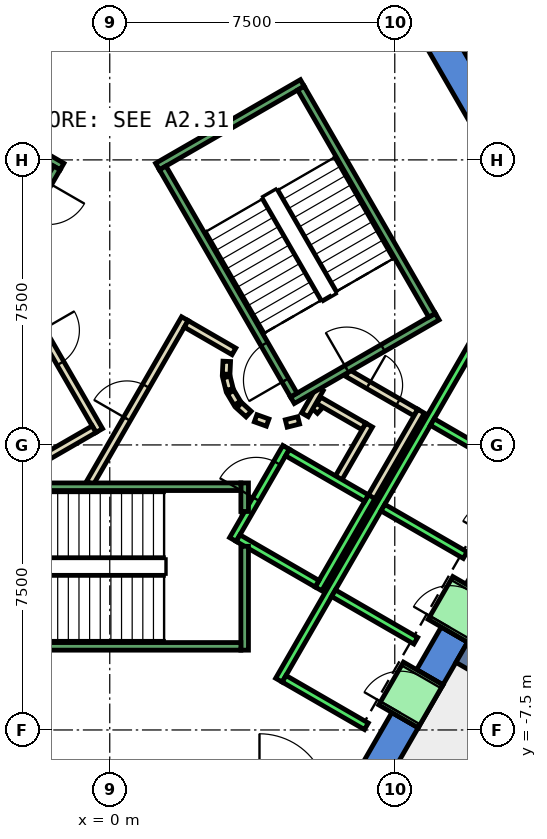
"""IFC4 building model, lengths in metres.
Left out: names, types, materials, properties, quantities, classifications, styles, units other than length and angle.
Written with IfcOpenShell. Run it as: python <this file> out.ifc"""

import sys

from ifc_helpers import new_model, si_unit, direction, frame, frame_2d, origin, place, context, subcontext, project, spatial, polyline, rectangle, outline, extrude, element, fill, save


model = new_model("IFC4")
c1 = context("Model", 3, precision=1e-05, world=origin(), true_north=direction((0.0, 1.0)))
c2 = subcontext(c1, "Body", "Model", "MODEL_VIEW")
j1 = project(units=[si_unit("LENGTHUNIT", "METRE"), si_unit("PLANEANGLEUNIT", "RADIAN")], contexts=[c1])
p1 = place(None, origin())
s1 = spatial("IfcSite", under=j1, at=p1, CompositionType="ELEMENT")
p2 = place(p1, origin())
s2 = spatial("IfcBuilding", under=s1, at=p2, CompositionType="ELEMENT")
p3 = place(p2, frame((0.0, 0.0, 150.8)))
s3 = spatial("IfcBuildingStorey", under=s2, at=p3, CompositionType="ELEMENT", Elevation=150.8)
p4 = place(p3, frame((0.0, 0.0, -0.4)))
e1 = element("IfcWall", 1, at=p4, inside=s3, PredefinedType="SHEAR", context=c2, shape_type="SweptSolid", body=[
    extrude(outline(polyline([(8.517, 11.748), (7.824, 11.348), (12.933, 2.5), (13.856, 2.5), (8.517, 11.748)])), origin(), (0.0, 0.0, 1.0), 4.2),
])
p5 = place(p3, frame((0.0, 0.0, -0.4)))
e2 = element("IfcWall", 2, at=p5, inside=s3, PredefinedType="SHEAR", context=c2, shape_type="SweptSolid", body=[
    extrude(outline(polyline([(8.117, -7.44), (7.424, -7.04), (6.466, -8.7), (6.928, -9.5), (8.117, -7.44)])), origin(), (0.0, 0.0, 1.0), 4.2),
])
p6 = place(p3, frame((0.0, 0.0, -0.4)))
e3 = element("IfcWall", 3, at=p6, inside=s3, PredefinedType="SHEAR", context=c2, shape_type="SweptSolid", body=[
    extrude(outline(polyline([(9.417, -5.189), (8.724, -4.789), (8.075, -5.914), (8.767, -6.314), (9.417, -5.189)])), origin(), (0.0, 0.0, 1.0), 4.2),
])
p7 = place(p3, frame((0.0, 0.0, -0.4)))
e4 = element("IfcWall", 4, at=p7, inside=s3, PredefinedType="SHEAR", context=c2, shape_type="SweptSolid", body=[
    extrude(outline(polyline([(10.717, -2.937), (10.025, -2.537), (9.374, -3.663), (10.067, -4.063), (10.717, -2.937)])), origin(), (0.0, 0.0, 1.0), 4.2),
])
p8 = place(p3, frame((0.0, 0.0, 3.6)))
e5 = element("IfcWall", 5, at=p8, inside=s3, PredefinedType="SHEAR", context=c2, shape_type="SweptSolid", body=[
    extrude(outline(polyline([(8.767, -6.314), (8.075, -5.914), (7.424, -7.04), (8.117, -7.44), (8.767, -6.314)])), origin(), (0.0, 0.0, 1.0), 0.2),
])
p9 = place(p3, frame((0.0, 0.0, 3.6)))
e6 = element("IfcWall", 6, at=p9, inside=s3, PredefinedType="SHEAR", context=c2, shape_type="SweptSolid", body=[
    extrude(outline(polyline([(10.067, -4.063), (9.374, -3.663), (8.724, -4.789), (9.417, -5.189), (10.067, -4.063)])), origin(), (0.0, 0.0, 1.0), 0.2),
])
p10 = place(p3, frame((9.31, -5.375, -0.4), z_axis=(0.0, 0.0, 1.0), x_axis=(0.866017533419, -0.500013631625, 0.0)))
e7 = element("IfcWall", 7, at=p10, inside=s3, PredefinedType="SHEAR", context=c2, shape_type="SweptSolid", body=[
    extrude(rectangle(XDim=9.0, YDim=0.8, at=frame_2d((4.5, 0.0))), origin(), (0.0, 0.0, 1.0), 4.2),
])
p11 = place(p3, frame((5.39, 0.898, 0.0), z_axis=(0.0, 0.0, 1.0), x_axis=(0.673828488714, 0.738887791073, 0.0)))
e8 = element("IfcWall", 8, at=p11, inside=s3, PredefinedType="PARTITIONING", context=c2, shape_type="SweptSolid", body=[
    extrude(rectangle(XDim=0.263, YDim=0.2, at=frame_2d((0.131, 0.0))), origin(), (0.0, 0.0, 1.0), 3.8),
])
p12 = place(p3, frame((5.499, 1.172, 0.0), z_axis=(0.0, 0.0, 1.0), x_axis=(0.866333505267, -0.499465972466, 0.0)))
e9 = element("IfcWall", 9, at=p12, inside=s3, PredefinedType="PARTITIONING", context=c2, shape_type="SweptSolid", body=[
    extrude(rectangle(XDim=1.374, YDim=0.2, at=frame_2d((0.687, 0.0))), origin(), (0.0, 0.0, 1.0), 3.8),
])
p13 = place(p3, frame((6.826, 0.522, 0.0), z_axis=(0.0, 0.0, 1.0), x_axis=(-0.500016722714, -0.866015748706, 0.0)))
e10 = element("IfcWall", 10, at=p13, inside=s3, PredefinedType="PARTITIONING", context=c2, shape_type="SweptSolid", body=[
    extrude(rectangle(XDim=1.7, YDim=0.2, at=frame_2d((0.85, 0.0))), origin(), (0.0, 0.0, 1.0), 3.8),
])
p14 = place(p3, frame((6.25, 1.894, 0.0), z_axis=(0.0, 0.0, 1.0), x_axis=(0.866043184279, -0.499969202016, 0.0)))
e11 = element("IfcWall", 11, at=p14, inside=s3, PredefinedType="PARTITIONING", context=c2, shape_type="SweptSolid", body=[
    extrude(rectangle(XDim=2.084, YDim=0.2, at=frame_2d((1.042, 0.0))), origin(), (0.0, 0.0, 1.0), 3.8),
])
p15 = place(p14, frame((0.642, 0.0, 0.0)))
e12 = element("IfcOpeningElement", 12, at=p15, cuts=e11, PredefinedType="OPENING", context=c2, shape_type="SweptSolid", body=[
    extrude(rectangle(XDim=0.9, YDim=2.1, at=frame_2d((0.45, 1.05))), frame((0.0, 0.11, 0.0), z_axis=(0.0, -1.0, 0.0), x_axis=(1.0, 0.0, 0.0)), (0.0, 0.0, 1.0), 0.22),
])
p16 = place(p3, frame((8.192, 0.888, 0.0), z_axis=(0.0, 0.0, 1.0), x_axis=(-0.499940625693, -0.866059680843, 0.0)))
e13 = element("IfcWall", 13, at=p16, inside=s3, PredefinedType="PARTITIONING", context=c2, shape_type="SweptSolid", body=[
    extrude(rectangle(XDim=2.68, YDim=0.2, at=frame_2d((1.34, 0.0))), origin(), (0.0, 0.0, 1.0), 3.8),
])
p17 = place(p3, frame((5.135, 0.793, 0.0), z_axis=(0.0, 0.0, 1.0), x_axis=(0.499526442893, 0.866298639529, 0.0)))
e14 = element("IfcWall", 14, at=p17, inside=s3, PredefinedType="PARTITIONING", context=c2, shape_type="SweptSolid", body=[
    extrude(rectangle(XDim=0.791, YDim=0.2, at=frame_2d((0.396, 0.0))), origin(), (0.0, 0.0, 1.0), 3.8),
])
p18 = place(p3, frame((-0.52, -1.0, 0.0), z_axis=(0.0, 0.0, 1.0), x_axis=(0.50011622646, 0.865958290007, 0.0)))
e15 = element("IfcWall", 15, at=p18, inside=s3, PredefinedType="PARTITIONING", context=c2, shape_type="SweptSolid", body=[
    extrude(rectangle(XDim=4.991, YDim=0.2, at=frame_2d((2.496, 0.0))), origin(), (0.0, 0.0, 1.0), 3.8),
])
p19 = place(p18, frame((1.945, 0.0, 0.0)))
e16 = element("IfcOpeningElement", 16, at=p19, cuts=e15, PredefinedType="OPENING", context=c2, shape_type="SweptSolid", body=[
    extrude(rectangle(XDim=1.0, YDim=2.1, at=frame_2d((0.5, 1.05))), frame((0.0, 0.11, 0.0), z_axis=(0.0, -1.0, 0.0), x_axis=(1.0, 0.0, 0.0)), (0.0, 0.0, 1.0), 0.22),
])
p20 = place(p3, frame((2.012, 3.186, 0.0), z_axis=(0.0, 0.0, 1.0), x_axis=(0.865891012941, -0.500232699559, 0.0)))
e17 = element("IfcWall", 17, at=p20, inside=s3, PredefinedType="PARTITIONING", context=c2, shape_type="SweptSolid", body=[
    extrude(rectangle(XDim=1.449, YDim=0.2, at=frame_2d((0.725, 0.0))), origin(), (0.0, 0.0, 1.0), 3.8),
])
p21 = place(p3, frame((3.079, 2.199, 0.0), z_axis=(0.0, 0.0, 1.0), x_axis=(-0.047771483479, -0.998858290933, 0.0)))
e18 = element("IfcWall", 18, at=p21, inside=s3, PredefinedType="PARTITIONING", context=c2, shape_type="SweptSolid", body=[
    extrude(rectangle(XDim=0.337, YDim=0.2, at=frame_2d((0.169, 0.0))), origin(), (0.0, 0.0, 1.0), 3.8),
])
p22 = place(p3, frame((3.07, 1.786, 0.0), z_axis=(0.0, 0.0, 1.0), x_axis=(0.242705583207, -0.970099994784, 0.0)))
e19 = element("IfcWall", 19, at=p22, inside=s3, PredefinedType="PARTITIONING", context=c2, shape_type="SweptSolid", body=[
    extrude(rectangle(XDim=0.338, YDim=0.2, at=frame_2d((0.169, 0.0))), origin(), (0.0, 0.0, 1.0), 3.8),
])
for number, where, z_axis, x_axis in (
    (20, (3.182, 1.388, 0.0), (0.0, 0.0, 1.0), (0.512, -0.859, 0.0)),
    (21, (3.404, 1.039, 0.0), (0.0, 0.0, 1.0), (0.74, -0.672, 0.0)),
):
    element("IfcWall", number, at=place(p3, frame(where, z_axis=z_axis, x_axis=x_axis)), inside=s3, PredefinedType="PARTITIONING", context=c2, shape_type="SweptSolid", body=[
        extrude(rectangle(XDim=0.338, YDim=0.2, at=frame_2d((0.169, 0.0))), origin(), (0.0, 0.0, 1.0), 3.8),
    ])
p23 = place(p3, frame((3.838, 0.702, 0.0), z_axis=(0.0, 0.0, 1.0), x_axis=(0.941035081519, -0.338308993895, 0.0)))
e22 = element("IfcWall", 22, at=p23, inside=s3, PredefinedType="PARTITIONING", context=c2, shape_type="SweptSolid", body=[
    extrude(rectangle(XDim=0.337, YDim=0.2, at=frame_2d((0.168, 0.0))), origin(), (0.0, 0.0, 1.0), 3.8),
])
p24 = place(p3, frame((4.644, 0.564, 0.0), z_axis=(0.0, 0.0, 1.0), x_axis=(0.969929076366, 0.243387729394, 0.0)))
e23 = element("IfcWall", 23, at=p24, inside=s3, PredefinedType="PARTITIONING", context=c2, shape_type="SweptSolid", body=[
    extrude(rectangle(XDim=0.337, YDim=0.2, at=frame_2d((0.168, 0.0))), origin(), (0.0, 0.0, 1.0), 3.8),
])
p25 = place(p3, frame((-2.771, 4.7, 0.0), z_axis=(0.0, 0.0, 1.0), x_axis=(0.499969479948, -0.866043023828, 0.0)))
e24 = element("IfcWall", 24, at=p25, inside=s3, PredefinedType="PARTITIONING", context=c2, shape_type="SweptSolid", body=[
    extrude(rectangle(XDim=4.99, YDim=0.2, at=frame_2d((2.495, 0.0))), origin(), (0.0, 0.0, 1.0), 3.8),
])
p26 = place(p25, frame((1.945, 0.0, 0.0)))
e25 = element("IfcOpeningElement", 25, at=p26, cuts=e24, PredefinedType="OPENING", context=c2, shape_type="SweptSolid", body=[
    extrude(rectangle(XDim=1.0, YDim=2.1, at=frame_2d((0.5, 1.05))), frame((0.0, 0.11, 0.0), z_axis=(0.0, -1.0, 0.0), x_axis=(1.0, 0.0, 0.0)), (0.0, 0.0, 1.0), 0.22),
])
p27 = place(p3, frame((-0.412, 0.414, 0.0), z_axis=(0.0, 0.0, 1.0), x_axis=(-0.866017369001, -0.500013916395, 0.0)))
e26 = element("IfcWall", 26, at=p27, inside=s3, PredefinedType="PARTITIONING", context=c2, shape_type="SweptSolid", body=[
    extrude(rectangle(XDim=1.45, YDim=0.2, at=frame_2d((0.725, 0.0))), origin(), (0.0, 0.0, 1.0), 3.8),
])
p28 = place(p3, frame((12.401, -7.621, 0.0), z_axis=(0.0, 0.0, 1.0), x_axis=(-0.499983724212, -0.866034800411, 0.0)))
e27 = element("IfcWall", 27, at=p28, inside=s3, PredefinedType="PARTITIONING", context=c2, shape_type="SweptSolid", body=[
    extrude(rectangle(XDim=9.302, YDim=0.2, at=frame_2d((4.651, 0.0))), origin(), (0.0, 0.0, 1.0), 3.8),
])
p29 = place(p3, frame((3.24, -2.488, 0.0), z_axis=(0.0, 0.0, 1.0), x_axis=(0.49994636267, 0.866056369097, 0.0)))
e28 = element("IfcWall", 28, at=p29, inside=s3, PredefinedType="STANDARD", context=c2, shape_type="SweptSolid", body=[
    extrude(rectangle(XDim=2.8, YDim=0.2, at=frame_2d((1.4, 0.0))), origin(), (0.0, 0.0, 1.0), 3.8),
])
p30 = place(p29, frame((1.225, 0.0, 0.0)))
e29 = element("IfcOpeningElement", 29, at=p30, cuts=e28, PredefinedType="OPENING", context=c2, shape_type="SweptSolid", body=[
    extrude(rectangle(XDim=1.1, YDim=2.1, at=frame_2d((0.55, 1.05))), frame((0.0, 0.11, 0.0), z_axis=(0.0, -1.0, 0.0), x_axis=(1.0, 0.0, 0.0)), (0.0, 0.0, 1.0), 0.22),
])
p31 = place(p3, frame((5.492, -3.788, 0.0), z_axis=(0.0, 0.0, 1.0), x_axis=(0.500011755427, 0.866018616679, 0.0)))
e30 = element("IfcWall", 30, at=p31, inside=s3, PredefinedType="STANDARD", context=c2, shape_type="SweptSolid", body=[
    extrude(rectangle(XDim=2.8, YDim=0.2, at=frame_2d((1.4, 0.0))), origin(), (0.0, 0.0, 1.0), 3.8),
])
p32 = place(p3, frame((3.377, -2.452, 0.0), z_axis=(0.0, 0.0, 1.0), x_axis=(0.865955154139, -0.50012165622, 0.0)))
e31 = element("IfcWall", 31, at=p32, inside=s3, PredefinedType="STANDARD", context=c2, shape_type="SweptSolid", body=[
    extrude(rectangle(XDim=2.4, YDim=0.2, at=frame_2d((1.2, 0.0))), origin(), (0.0, 0.0, 1.0), 3.8),
])
p33 = place(p3, frame((4.677, -0.2, 0.0), z_axis=(0.0, 0.0, 1.0), x_axis=(0.865973769406, -0.500089422704, 0.0)))
e32 = element("IfcWall", 32, at=p33, inside=s3, PredefinedType="STANDARD", context=c2, shape_type="SweptSolid", body=[
    extrude(rectangle(XDim=2.399, YDim=0.2, at=frame_2d((1.2, 0.0))), origin(), (0.0, 0.0, 1.0), 3.8),
])
p34 = place(p3, frame((4.451, -6.19, 0.0), z_axis=(0.0, 0.0, 1.0), x_axis=(0.50000090737, 0.866024879913, 0.0)))
e33 = element("IfcWall", 33, at=p34, inside=s3, PredefinedType="STANDARD", context=c2, shape_type="SweptSolid", body=[
    extrude(rectangle(XDim=10.6, YDim=0.2, at=frame_2d((5.3, 0.0))), origin(), (0.0, 0.0, 1.0), 3.8),
])
for number, where, z_axis, x_axis in (
    (34, (4.588, -6.153, 0.0), (0.0, 0.0, 1.0), (0.866, -0.5, 0.0)),
    (35, (5.888, -3.902, 0.0), (0.0, 0.0, 1.0), (0.866, -0.5, 0.0)),
    (36, (7.188, -1.65, 0.0), (0.0, 0.0, 1.0), (0.866, -0.5, 0.0)),
    (37, (8.488, 0.602, 0.0), (0.0, 0.0, 1.0), (0.866, -0.5, 0.0)),
):
    element("IfcWall", number, at=place(p3, frame(where, z_axis=z_axis, x_axis=x_axis)), inside=s3, PredefinedType="STANDARD", context=c2, shape_type="SweptSolid", body=[
        extrude(rectangle(XDim=2.5, YDim=0.2, at=frame_2d((1.25, 0.0))), origin(), (0.0, 0.0, 1.0), 3.8),
    ])
p35 = place(p3, frame((7.598, -7.14, 0.0), z_axis=(0.0, 0.0, 1.0), x_axis=(0.500362116554, 0.865816234728, 0.0)))
e38 = element("IfcWall", 38, at=p35, inside=s3, PredefinedType="STANDARD", context=c2, shape_type="SweptSolid", body=[
    extrude(rectangle(XDim=1.299, YDim=1.2, at=frame_2d((0.65, 0.0))), origin(), (0.0, 0.0, 1.0), 2.4),
])
p36 = place(p35, frame((0.1, 0.0, 0.0)))
e39 = element("IfcOpeningElement", 39, at=p36, cuts=e38, PredefinedType="OPENING", context=c2, shape_type="SweptSolid", body=[
    extrude(rectangle(XDim=1.1, YDim=2.3, at=frame_2d((0.55, 1.15))), frame((0.0, 0.61, 0.0), z_axis=(0.0, -1.0, 0.0), x_axis=(1.0, 0.0, 0.0)), (0.0, 0.0, 1.0), 1.22),
])
p37 = place(p3, frame((8.898, -4.889, 0.0), z_axis=(0.0, 0.0, 1.0), x_axis=(0.500036693733, 0.866004217611, 0.0)))
e40 = element("IfcWall", 40, at=p37, inside=s3, PredefinedType="STANDARD", context=c2, shape_type="SweptSolid", body=[
    extrude(rectangle(XDim=1.3, YDim=1.2, at=frame_2d((0.65, 0.0))), origin(), (0.0, 0.0, 1.0), 2.4),
])
p38 = place(p37, frame((0.1, 0.0, 0.0)))
e41 = element("IfcOpeningElement", 41, at=p38, cuts=e40, PredefinedType="OPENING", context=c2, shape_type="SweptSolid", body=[
    extrude(rectangle(XDim=1.1, YDim=2.3, at=frame_2d((0.55, 1.15))), frame((0.0, 0.61, 0.0), z_axis=(0.0, -1.0, 0.0), x_axis=(1.0, 0.0, 0.0)), (0.0, 0.0, 1.0), 1.22),
])
p39 = place(p3, frame((3.55, -2.667, 0.0), z_axis=(0.0, 0.0, 1.0), x_axis=(0.0, -1.0, 0.0)))
e42 = element("IfcWall", 42, at=p39, inside=s3, PredefinedType="STANDARD", context=c2, shape_type="SweptSolid", body=[
    extrude(rectangle(XDim=2.733, YDim=0.2, at=frame_2d((1.366, 0.0))), origin(), (0.0, 0.0, 1.0), 3.8),
])
p40 = place(p3, frame((3.55, -1.0, 0.0), z_axis=(0.0, 0.0, 1.0), x_axis=(0.0, -1.0, 0.0)))
e43 = element("IfcWall", 43, at=p40, inside=s3, PredefinedType="STANDARD", context=c2, shape_type="SweptSolid", body=[
    extrude(rectangle(XDim=0.751, YDim=0.2, at=frame_2d((0.375, 0.0))), origin(), (0.0, 0.0, 1.0), 3.8),
])
p41 = place(p3, frame((-3.45, -1.1, 0.0), z_axis=(0.0, 0.0, 1.0), x_axis=(1.0, 0.0, 0.0)))
e44 = element("IfcWall", 44, at=p41, inside=s3, PredefinedType="STANDARD", context=c2, shape_type="SweptSolid", body=[
    extrude(rectangle(XDim=6.9, YDim=0.2, at=frame_2d((3.45, 0.0))), origin(), (0.0, 0.0, 1.0), 3.8),
])
p42 = place(p41, frame((0.45, 0.0, 0.0)))
e45 = element("IfcOpeningElement", 45, at=p42, cuts=e44, PredefinedType="OPENING", context=c2, shape_type="SweptSolid", body=[
    extrude(rectangle(XDim=1.1, YDim=2.2, at=frame_2d((0.55, 1.1))), frame((0.0, 0.11, 0.0), z_axis=(0.0, -1.0, 0.0), x_axis=(1.0, 0.0, 0.0)), (0.0, 0.0, 1.0), 0.22),
])
p43 = place(p3, frame((-3.45, -5.3, 0.0), z_axis=(0.0, 0.0, 1.0), x_axis=(1.0, 0.0, 0.0)))
e46 = element("IfcWall", 46, at=p43, inside=s3, PredefinedType="STANDARD", context=c2, shape_type="SweptSolid", body=[
    extrude(rectangle(XDim=6.9, YDim=0.2, at=frame_2d((3.45, 0.0))), origin(), (0.0, 0.0, 1.0), 3.8),
])
p44 = place(p3, frame((4.806, 1.176, 0.0), z_axis=(0.0, 0.0, 1.0), x_axis=(0.866059941101, 0.499940174841, 0.0)))
e47 = element("IfcWall", 47, at=p44, inside=s3, PredefinedType="STANDARD", context=c2, shape_type="SweptSolid", body=[
    extrude(rectangle(XDim=4.4, YDim=0.2, at=frame_2d((2.2, 0.0))), origin(), (0.0, 0.0, 1.0), 3.8),
])
p45 = place(p44, frame((1.65, 0.0, 0.0)))
e48 = element("IfcOpeningElement", 48, at=p45, cuts=e47, PredefinedType="OPENING", context=c2, shape_type="SweptSolid", body=[
    extrude(rectangle(XDim=1.1, YDim=2.2, at=frame_2d((0.55, 1.1))), frame((0.0, 0.11, 0.0), z_axis=(0.0, -1.0, 0.0), x_axis=(1.0, 0.0, 0.0)), (0.0, 0.0, 1.0), 0.22),
])
p46 = place(p3, frame((1.256, 7.324, 0.0), z_axis=(0.0, 0.0, 1.0), x_axis=(0.866046073146, 0.499964197906, 0.0)))
e49 = element("IfcWall", 49, at=p46, inside=s3, PredefinedType="STANDARD", context=c2, shape_type="SweptSolid", body=[
    extrude(rectangle(XDim=4.4, YDim=0.2, at=frame_2d((2.2, 0.0))), origin(), (0.0, 0.0, 1.0), 3.8),
])
p47 = place(p3, frame((4.843, 1.312, 0.0), z_axis=(0.0, 0.0, 1.0), x_axis=(-0.499963383562, 0.866046543262, 0.0)))
e50 = element("IfcWall", 50, at=p47, inside=s3, PredefinedType="STANDARD", context=c2, shape_type="SweptSolid", body=[
    extrude(rectangle(XDim=6.9, YDim=0.2, at=frame_2d((3.45, 0.0))), origin(), (0.0, 0.0, 1.0), 3.8),
])
p48 = place(p47, frame((0.45, 0.0, 0.0)))
e51 = element("IfcOpeningElement", 51, at=p48, cuts=e50, PredefinedType="OPENING", context=c2, shape_type="SweptSolid", body=[
    extrude(rectangle(XDim=1.1, YDim=2.2, at=frame_2d((0.55, 1.1))), frame((0.0, 0.11, 0.0), z_axis=(0.0, -1.0, 0.0), x_axis=(1.0, 0.0, 0.0)), (0.0, 0.0, 1.0), 0.22),
])
p49 = place(p3, frame((8.48, 3.412, 0.0), z_axis=(0.0, 0.0, 1.0), x_axis=(-0.499978703459, 0.866037698999, 0.0)))
e52 = element("IfcWall", 52, at=p49, inside=s3, PredefinedType="STANDARD", context=c2, shape_type="SweptSolid", body=[
    extrude(rectangle(XDim=6.9, YDim=0.2, at=frame_2d((3.45, 0.0))), origin(), (0.0, 0.0, 1.0), 3.8),
])
p50 = place(p3, frame((-1.256, 7.324, 0.0), z_axis=(0.0, 0.0, 1.0), x_axis=(-0.866046073146, 0.499964197906, 0.0)))
e53 = element("IfcWall", 53, at=p50, inside=s3, PredefinedType="STANDARD", context=c2, shape_type="SweptSolid", body=[
    extrude(rectangle(XDim=4.4, YDim=0.2, at=frame_2d((2.2, 0.0))), origin(), (0.0, 0.0, 1.0), 3.8),
])
p51 = place(p50, frame((1.65, 0.0, 0.0)))
e54 = element("IfcOpeningElement", 54, at=p51, cuts=e53, PredefinedType="OPENING", context=c2, shape_type="SweptSolid", body=[
    extrude(rectangle(XDim=1.1, YDim=2.2, at=frame_2d((0.55, 1.1))), frame((0.0, 0.11, 0.0), z_axis=(0.0, -1.0, 0.0), x_axis=(1.0, 0.0, 0.0)), (0.0, 0.0, 1.0), 0.22),
])
p52 = place(p3, frame((-1.393, 7.288, 0.0), z_axis=(0.0, 0.0, 1.0), x_axis=(-0.499963383562, -0.866046543262, 0.0)))
e55 = element("IfcWall", 55, at=p52, inside=s3, PredefinedType="STANDARD", context=c2, shape_type="SweptSolid", body=[
    extrude(rectangle(XDim=6.9, YDim=0.2, at=frame_2d((3.45, 0.0))), origin(), (0.0, 0.0, 1.0), 3.8),
])
p53 = place(p52, frame((0.45, 0.0, 0.0)))
e56 = element("IfcOpeningElement", 56, at=p53, cuts=e55, PredefinedType="OPENING", context=c2, shape_type="SweptSolid", body=[
    extrude(rectangle(XDim=1.1, YDim=2.2, at=frame_2d((0.55, 1.1))), frame((0.0, 0.11, 0.0), z_axis=(0.0, -1.0, 0.0), x_axis=(1.0, 0.0, 0.0)), (0.0, 0.0, 1.0), 0.22),
])
p54 = place(p19, origin())
e57 = element("IfcDoor", 57, at=p54, inside=s3, OperationType="SINGLE_SWING_LEFT", PredefinedType="DOOR", context=c2, shape_type="SweptSolid", body=[
    extrude(rectangle(XDim=1.0, YDim=2.1, at=frame_2d((0.5, 1.05))), frame((0.0, 0.025, 0.0), z_axis=(0.0, -1.0, 0.0), x_axis=(1.0, 0.0, 0.0)), (0.0, 0.0, 1.0), 0.05),
])
fill(e16, e57)
p55 = place(p26, origin())
e58 = element("IfcDoor", 58, at=p55, inside=s3, OperationType="SINGLE_SWING_RIGHT", PredefinedType="DOOR", context=c2, shape_type="SweptSolid", body=[
    extrude(rectangle(XDim=1.0, YDim=2.1, at=frame_2d((0.5, 1.05))), frame((0.0, 0.025, 0.0), z_axis=(0.0, -1.0, 0.0), x_axis=(1.0, 0.0, 0.0)), (0.0, 0.0, 1.0), 0.05),
])
fill(e25, e58)
p56 = place(p15, origin())
e59 = element("IfcDoor", 59, at=p56, inside=s3, OperationType="SINGLE_SWING_LEFT", PredefinedType="DOOR", context=c2, shape_type="SweptSolid", body=[
    extrude(rectangle(XDim=0.9, YDim=2.1, at=frame_2d((0.45, 1.05))), frame((0.0, 0.025, 0.0), z_axis=(0.0, -1.0, 0.0), x_axis=(1.0, 0.0, 0.0)), (0.0, 0.0, 1.0), 0.05),
])
fill(e12, e59)
p57 = place(p36, origin())
e60 = element("IfcDoor", 60, at=p57, inside=s3, OperationType="SLIDING_TO_LEFT", PredefinedType="DOOR", context=c2, shape_type="SweptSolid", body=[
    extrude(rectangle(XDim=1.1, YDim=2.3, at=frame_2d((0.55, 1.15))), frame((0.0, 0.025, 0.0), z_axis=(0.0, -1.0, 0.0), x_axis=(1.0, 0.0, 0.0)), (0.0, 0.0, 1.0), 0.05),
])
fill(e39, e60)
p58 = place(p38, origin())
e61 = element("IfcDoor", 61, at=p58, inside=s3, OperationType="SLIDING_TO_LEFT", PredefinedType="DOOR", context=c2, shape_type="SweptSolid", body=[
    extrude(rectangle(XDim=1.1, YDim=2.3, at=frame_2d((0.55, 1.15))), frame((0.0, 0.025, 0.0), z_axis=(0.0, -1.0, 0.0), x_axis=(1.0, 0.0, 0.0)), (0.0, 0.0, 1.0), 0.05),
])
fill(e41, e61)
p59 = place(p30, origin())
e62 = element("IfcDoor", 62, at=p59, inside=s3, OperationType="SLIDING_TO_LEFT", PredefinedType="DOOR", context=c2, shape_type="SweptSolid", body=[
    extrude(rectangle(XDim=1.1, YDim=2.1, at=frame_2d((0.55, 1.05))), frame((0.0, 0.025, 0.0), z_axis=(0.0, -1.0, 0.0), x_axis=(1.0, 0.0, 0.0)), (0.0, 0.0, 1.0), 0.05),
])
fill(e29, e62)
p60 = place(p48, origin())
e63 = element("IfcDoor", 63, at=p60, inside=s3, OperationType="SINGLE_SWING_LEFT", PredefinedType="DOOR", context=c2, shape_type="SweptSolid", body=[
    extrude(rectangle(XDim=1.1, YDim=2.2, at=frame_2d((0.55, 1.1))), frame((0.0, 0.025, 0.0), z_axis=(0.0, -1.0, 0.0), x_axis=(1.0, 0.0, 0.0)), (0.0, 0.0, 1.0), 0.05),
])
fill(e51, e63)
p61 = place(p45, origin())
e64 = element("IfcDoor", 64, at=p61, inside=s3, OperationType="SINGLE_SWING_LEFT", PredefinedType="DOOR", context=c2, shape_type="SweptSolid", body=[
    extrude(rectangle(XDim=1.1, YDim=2.2, at=frame_2d((0.55, 1.1))), frame((0.0, 0.025, 0.0), z_axis=(0.0, -1.0, 0.0), x_axis=(1.0, 0.0, 0.0)), (0.0, 0.0, 1.0), 0.05),
])
fill(e48, e64)
save(model, sys.argv[1])
